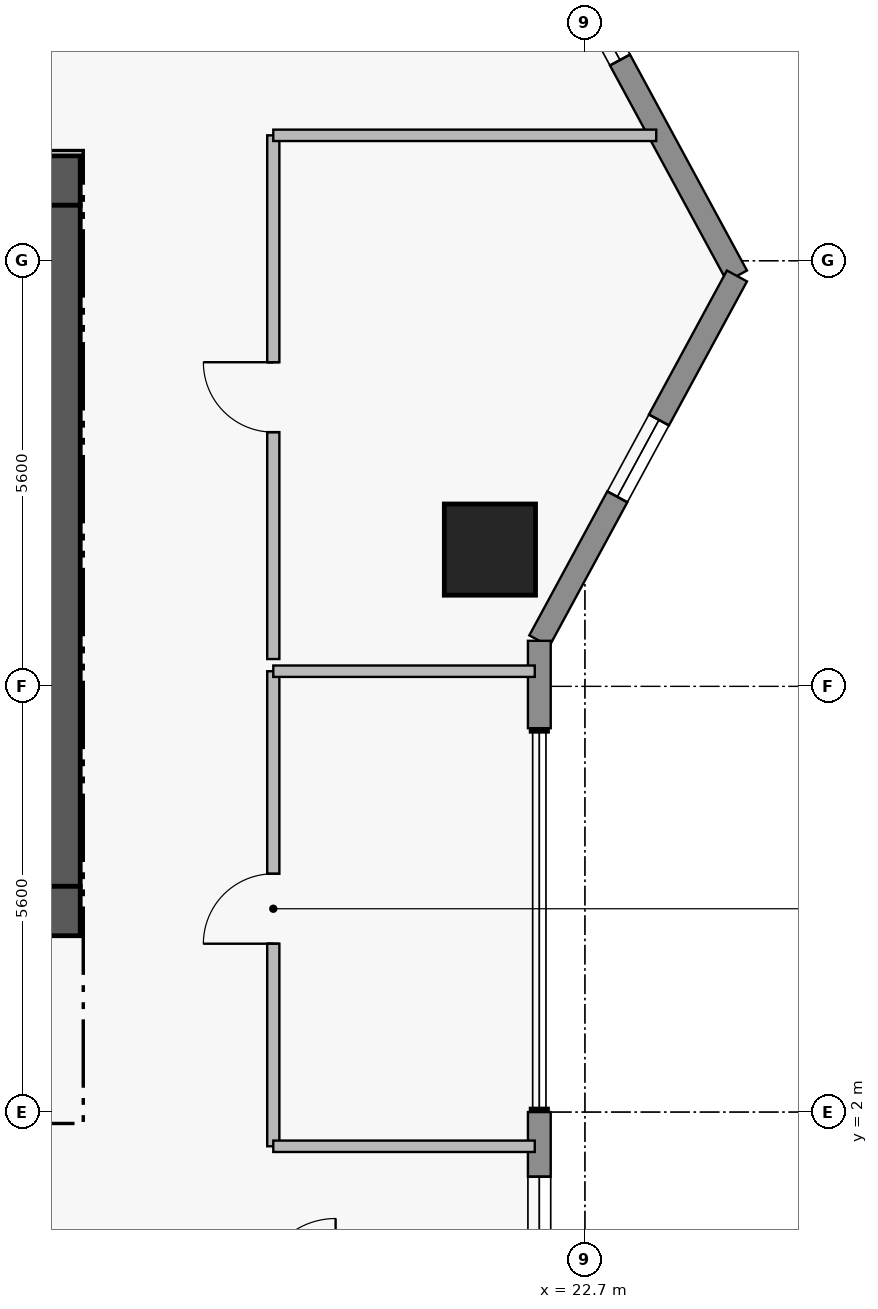
"""IFC4 building model, lengths in metres.
Left out: names, types, materials, properties, quantities, classifications, styles, units other than length and angle.
Written with IfcOpenShell. Run it as: python <this file> out.ifc"""

import sys

from ifc_helpers import new_model, si_unit, direction, frame, frame_2d, origin, origin_2d, place, context, subcontext, project, spatial, rectangle, extrude, element, fill, save


model = new_model("IFC4")
c1 = context("Model", 3, precision=1e-05, world=origin(), true_north=direction((0.0, 1.0)))
c2 = subcontext(c1, "Body", "Model", "MODEL_VIEW")
j1 = project(units=[si_unit("LENGTHUNIT", "METRE"), si_unit("PLANEANGLEUNIT", "RADIAN")], contexts=[c1])
p1 = place(None, origin())
s1 = spatial("IfcSite", under=j1, at=p1, CompositionType="ELEMENT")
p2 = place(p1, origin())
s2 = spatial("IfcBuilding", under=s1, at=p2, CompositionType="ELEMENT")
p3 = place(p2, frame((0.0, 0.0, 177.4)))
s3 = spatial("IfcBuildingStorey", under=s2, at=p3, CompositionType="ELEMENT", Elevation=177.4)
p4 = place(p3, frame((11.6, 14.255, 0.0), z_axis=(0.0, 0.0, 1.0), x_axis=(1.0, 0.0, 0.0)))
e1 = element("IfcWall", 1, at=p4, inside=s3, PredefinedType="SHEAR", context=c2, shape_type="SweptSolid", body=[
    extrude(rectangle(XDim=4.46, YDim=0.65, at=frame_2d((2.23, 0.0))), origin(), (0.0, 0.0, 1.0), 3.56),
])
p5 = place(p3, frame((15.735, 4.97, 0.0), z_axis=(0.0, 0.0, 1.0), x_axis=(0.0, 1.0, 0.0)))
e2 = element("IfcWall", 2, at=p5, inside=s3, PredefinedType="SHEAR", context=c2, shape_type="SweptSolid", body=[
    extrude(rectangle(XDim=8.96, YDim=0.65, at=frame_2d((4.48, 0.0))), origin(), (0.0, 0.0, 1.0), 3.56),
])
p6 = place(p3, frame((11.6, 4.645, 0.0), z_axis=(0.0, 0.0, 1.0), x_axis=(1.0, 0.0, 0.0)))
e3 = element("IfcWall", 3, at=p6, inside=s3, PredefinedType="SHEAR", context=c2, shape_type="SweptSolid", body=[
    extrude(rectangle(XDim=4.46, YDim=0.65, at=frame_2d((2.23, 0.0))), origin(), (0.0, 0.0, 1.0), 3.56),
])
p7 = place(p3, frame((21.45, 9.4, 0.0), z_axis=(0.0, 0.0, 1.0), x_axis=(1.0, 0.0, 0.0)))
e4 = element("IfcColumn", 4, at=p7, inside=s3, PredefinedType="COLUMN", context=c2, shape_type="SweptSolid", body=[
    extrude(rectangle(XDim=1.2, YDim=1.2, at=origin_2d()), origin(), (0.0, 0.0, 1.0), 3.75),
])
p8 = place(p3, frame((22.1, 17.8, 0.0), z_axis=(0.0, 0.0, 1.0), x_axis=(0.476258655584, -0.879305233114, 0.0)))
e5 = element("IfcWall", 5, at=p8, inside=s3, PredefinedType="STANDARD", context=c2, shape_type="SweptSolid", body=[
    extrude(rectangle(XDim=5.459, YDim=0.3, at=frame_2d((2.729, 0.0))), origin(), (0.0, 0.0, 1.0), 3.53),
])
p9 = place(p8, frame((1.078, 0.0, 1.25)))
e6 = element("IfcOpeningElement", 6, at=p9, cuts=e5, PredefinedType="OPENING", context=c2, shape_type="SweptSolid", body=[
    extrude(rectangle(XDim=1.15, YDim=1.55, at=frame_2d((0.575, 0.775))), frame((0.0, 0.16, 0.0), z_axis=(0.0, -1.0, 0.0), x_axis=(1.0, 0.0, 0.0)), (0.0, 0.0, 1.0), 0.32),
])
p10 = place(p3, frame((24.7, 13.0, 0.0), z_axis=(0.0, 0.0, 1.0), x_axis=(-0.476258655584, -0.879305233114, 0.0)))
e7 = element("IfcWall", 7, at=p10, inside=s3, PredefinedType="STANDARD", context=c2, shape_type="SweptSolid", body=[
    extrude(rectangle(XDim=5.459, YDim=0.3, at=frame_2d((2.729, 0.0))), origin(), (0.0, 0.0, 1.0), 3.53),
])
p11 = place(p10, frame((2.155, 0.0, 1.25)))
e8 = element("IfcOpeningElement", 8, at=p11, cuts=e7, PredefinedType="OPENING", context=c2, shape_type="SweptSolid", body=[
    extrude(rectangle(XDim=1.15, YDim=1.55, at=frame_2d((0.575, 0.775))), frame((0.0, 0.16, 0.0), z_axis=(0.0, -1.0, 0.0), x_axis=(1.0, 0.0, 0.0)), (0.0, 0.0, 1.0), 0.32),
])
p12 = place(p3, frame((22.1, 8.2, 0.0), z_axis=(0.0, 0.0, 1.0), x_axis=(0.0, -1.0, 0.0)))
e9 = element("IfcWall", 9, at=p12, inside=s3, PredefinedType="STANDARD", context=c2, shape_type="SweptSolid", body=[
    extrude(rectangle(XDim=1.15, YDim=0.3, at=frame_2d((0.575, 0.0))), origin(), (0.0, 0.0, 1.0), 3.53),
])
p13 = place(p3, frame((22.1, 2.0, 0.0), z_axis=(0.0, 0.0, 1.0), x_axis=(0.0, -1.0, 0.0)))
e10 = element("IfcWall", 10, at=p13, inside=s3, PredefinedType="STANDARD", context=c2, shape_type="SweptSolid", body=[
    extrude(rectangle(XDim=2.85, YDim=0.3, at=frame_2d((1.425, 0.0))), origin(), (0.0, 0.0, 1.0), 3.53),
])
p14 = place(p13, frame((0.85, 0.0, 0.95)))
e11 = element("IfcOpeningElement", 11, at=p14, cuts=e10, PredefinedType="OPENING", context=c2, shape_type="SweptSolid", body=[
    extrude(rectangle(XDim=1.15, YDim=1.55, at=frame_2d((0.575, 0.775))), frame((0.0, 0.16, 0.0), z_axis=(0.0, -1.0, 0.0), x_axis=(1.0, 0.0, 0.0)), (0.0, 0.0, 1.0), 0.32),
])
p15 = place(p3, frame((18.6, 1.55, 0.0), z_axis=(0.0, 0.0, 1.0), x_axis=(0.0, 1.0, 0.0)))
e12 = element("IfcWall", 12, at=p15, inside=s3, PredefinedType="PARTITIONING", context=c2, shape_type="SweptSolid", body=[
    extrude(rectangle(XDim=6.25, YDim=0.16, at=frame_2d((3.125, 0.0))), origin(), (0.0, 0.0, 1.0), 3.53),
])
p16 = place(p15, frame((2.665, 0.0, 0.0)))
e13 = element("IfcOpeningElement", 13, at=p16, cuts=e12, PredefinedType="OPENING", context=c2, shape_type="SweptSolid", body=[
    extrude(rectangle(XDim=0.92, YDim=2.12, at=frame_2d((0.46, 1.06))), frame((0.0, 0.09, 0.0), z_axis=(0.0, -1.0, 0.0), x_axis=(1.0, 0.0, 0.0)), (0.0, 0.0, 1.0), 0.18),
])
p17 = place(p3, frame((18.6, 7.96, 0.0), z_axis=(0.0, 0.0, 1.0), x_axis=(0.0, 1.0, 0.0)))
e14 = element("IfcWall", 14, at=p17, inside=s3, PredefinedType="PARTITIONING", context=c2, shape_type="SweptSolid", body=[
    extrude(rectangle(XDim=6.89, YDim=0.16, at=frame_2d((3.445, 0.0))), origin(), (0.0, 0.0, 1.0), 3.53),
])
p18 = place(p17, frame((2.985, 0.0, 0.0)))
e15 = element("IfcOpeningElement", 15, at=p18, cuts=e14, PredefinedType="OPENING", context=c2, shape_type="SweptSolid", body=[
    extrude(rectangle(XDim=0.92, YDim=2.12, at=frame_2d((0.46, 1.06))), frame((0.0, 0.09, 0.0), z_axis=(0.0, -1.0, 0.0), x_axis=(1.0, 0.0, 0.0)), (0.0, 0.0, 1.0), 0.18),
])
for number, where, z_axis, x_axis in (
    (16, (18.6, 1.55, 0.0), (0.0, 0.0, 1.0), (1.0, 0.0, 0.0)),
    (17, (18.6, 7.8, 0.0), (0.0, 0.0, 1.0), (1.0, 0.0, 0.0)),
):
    element("IfcWall", number, at=place(p3, frame(where, z_axis=z_axis, x_axis=x_axis)), inside=s3, PredefinedType="PARTITIONING", context=c2, shape_type="SweptSolid", body=[
        extrude(rectangle(XDim=3.44, YDim=0.15, at=frame_2d((1.72, 0.0))), origin(), (0.0, 0.0, 1.0), 3.53),
    ])
p19 = place(p3, frame((18.6, 14.85, 0.0), z_axis=(0.0, 0.0, 1.0), x_axis=(1.0, 0.0, 0.0)))
e18 = element("IfcWall", 18, at=p19, inside=s3, PredefinedType="PARTITIONING", context=c2, shape_type="SweptSolid", body=[
    extrude(rectangle(XDim=5.038, YDim=0.15, at=frame_2d((2.519, 0.0))), origin(), (0.0, 0.0, 1.0), 3.53),
])
p20 = place(p9, origin())
e19 = element("IfcWindow", 19, at=p20, inside=s3, PartitioningType="SINGLE_PANEL", PredefinedType="WINDOW", context=c2, shape_type="SweptSolid", body=[
    extrude(rectangle(XDim=1.15, YDim=1.55, at=frame_2d((0.575, 0.775))), frame((0.0, 0.03, 0.0), z_axis=(0.0, -1.0, 0.0), x_axis=(1.0, 0.0, 0.0)), (0.0, 0.0, 1.0), 0.06),
])
fill(e6, e19)
p21 = place(p11, origin())
e20 = element("IfcWindow", 20, at=p21, inside=s3, PartitioningType="SINGLE_PANEL", PredefinedType="WINDOW", context=c2, shape_type="SweptSolid", body=[
    extrude(rectangle(XDim=1.15, YDim=1.55, at=frame_2d((0.575, 0.775))), frame((0.0, 0.03, 0.0), z_axis=(0.0, -1.0, 0.0), x_axis=(1.0, 0.0, 0.0)), (0.0, 0.0, 1.0), 0.06),
])
fill(e8, e20)
p22 = place(p14, origin())
e21 = element("IfcWindow", 21, at=p22, inside=s3, PartitioningType="SINGLE_PANEL", PredefinedType="WINDOW", context=c2, shape_type="SweptSolid", body=[
    extrude(rectangle(XDim=1.15, YDim=1.55, at=frame_2d((0.575, 0.775))), frame((0.0, 0.03, 0.0), z_axis=(0.0, -1.0, 0.0), x_axis=(1.0, 0.0, 0.0)), (0.0, 0.0, 1.0), 0.06),
])
fill(e11, e21)
p23 = place(p16, origin())
e22 = element("IfcDoor", 22, at=p23, inside=s3, OperationType="SINGLE_SWING_LEFT", PredefinedType="DOOR", context=c2, shape_type="SweptSolid", body=[
    extrude(rectangle(XDim=0.92, YDim=2.12, at=frame_2d((0.46, 1.06))), frame((0.0, 0.025, 0.0), z_axis=(0.0, -1.0, 0.0), x_axis=(1.0, 0.0, 0.0)), (0.0, 0.0, 1.0), 0.05),
])
fill(e13, e22)
p24 = place(p18, origin())
e23 = element("IfcDoor", 23, at=p24, inside=s3, OperationType="SINGLE_SWING_RIGHT", PredefinedType="DOOR", context=c2, shape_type="SweptSolid", body=[
    extrude(rectangle(XDim=0.92, YDim=2.12, at=frame_2d((0.46, 1.06))), frame((0.0, 0.025, 0.0), z_axis=(0.0, -1.0, 0.0), x_axis=(1.0, 0.0, 0.0)), (0.0, 0.0, 1.0), 0.05),
])
fill(e15, e23)
save(model, sys.argv[1])
